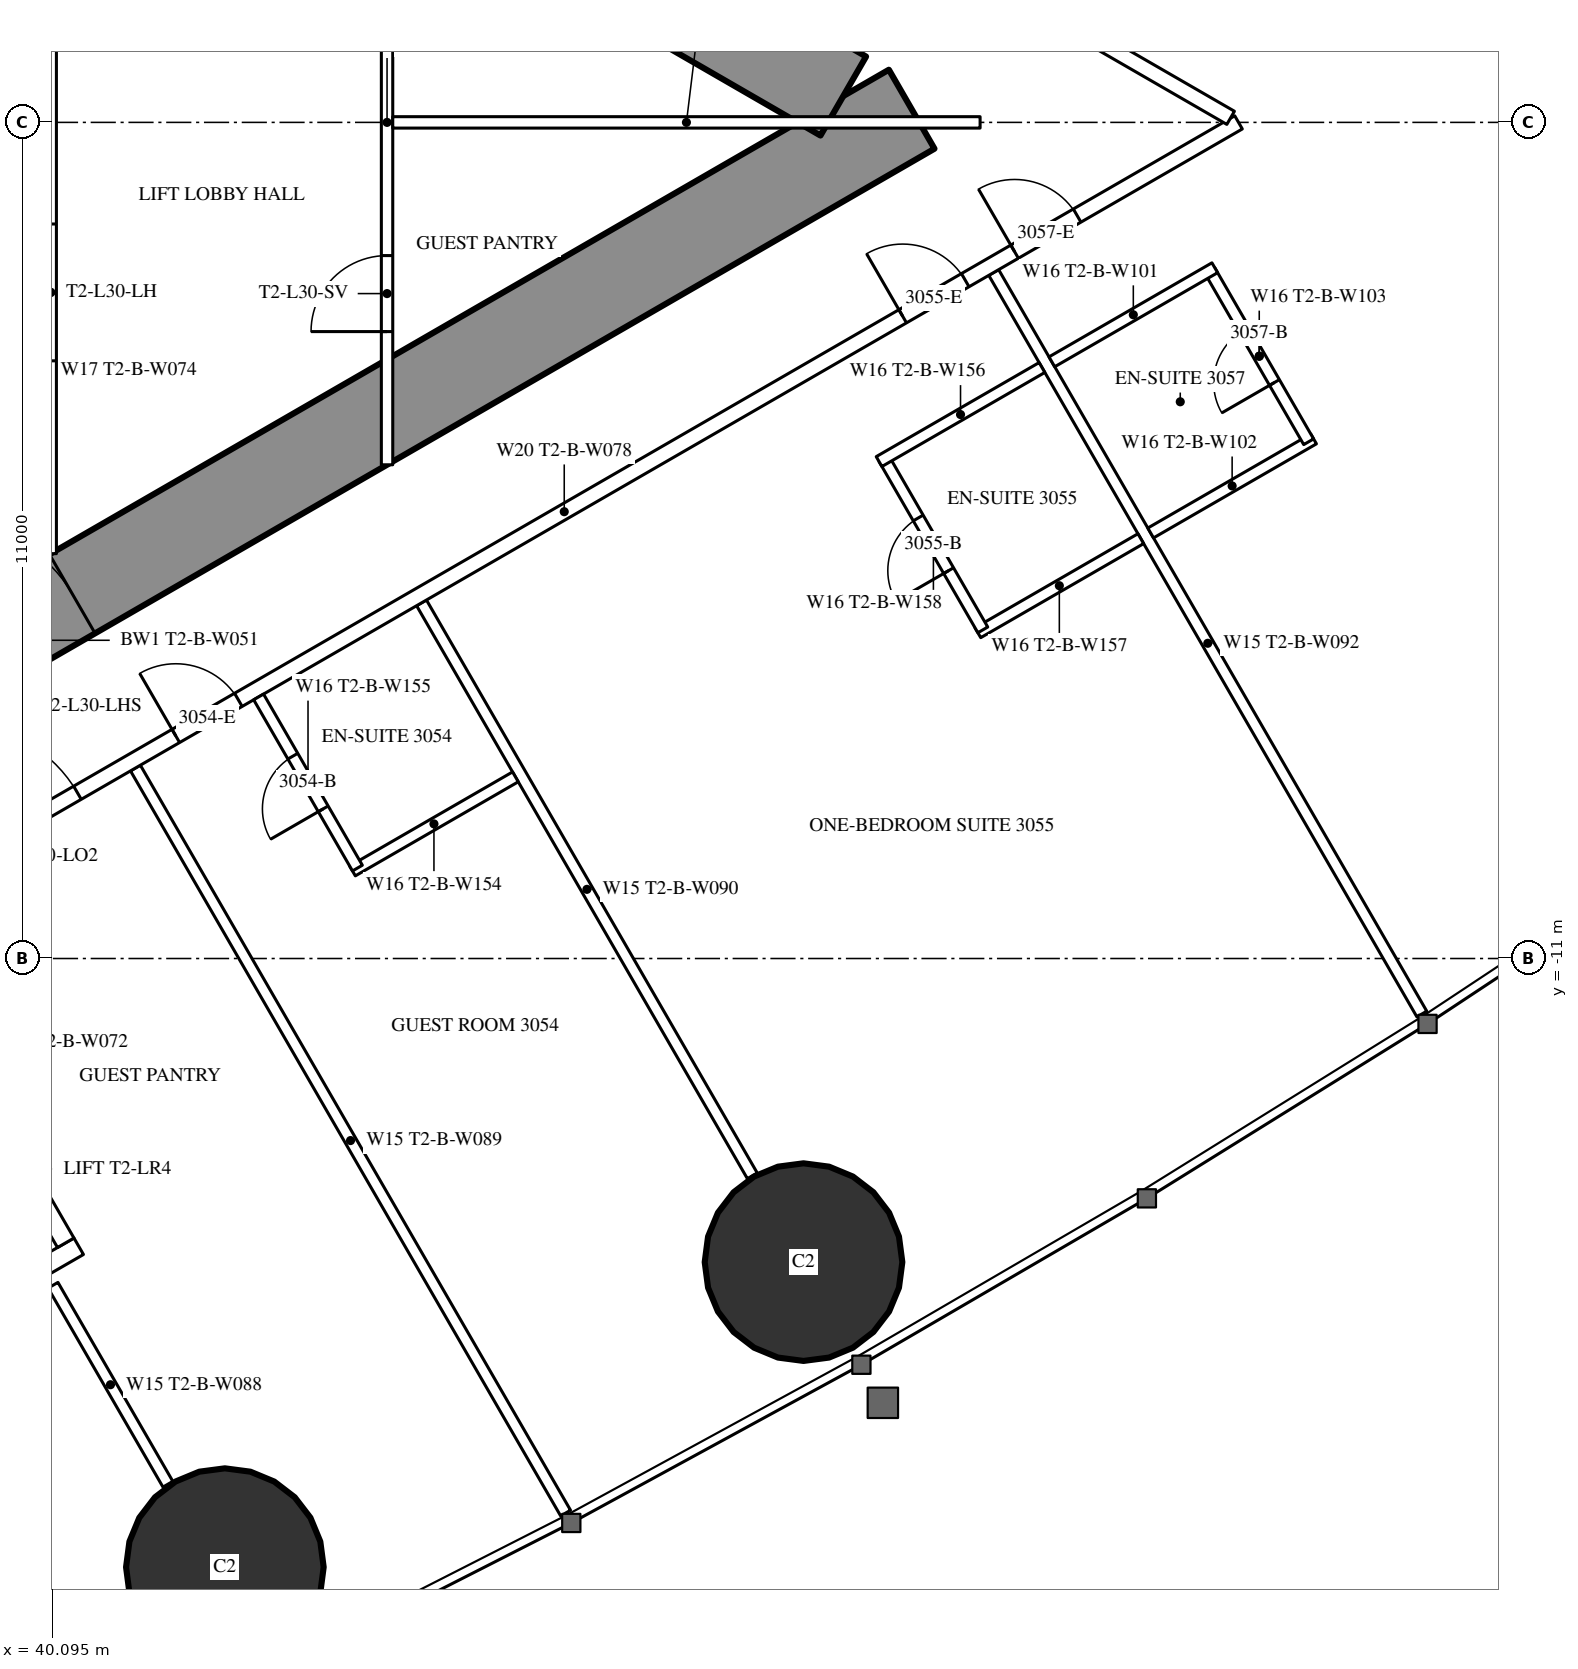
"""IFC4 building model, lengths in metres.
Left out: names, types, materials, properties, quantities, classifications, styles, units other than length and angle.
Written with IfcOpenShell. Run it as: python <this file> out.ifc"""

import sys

from ifc_helpers import new_model, si_unit, direction, frame, frame_2d, origin, origin_2d, place, context, subcontext, project, spatial, rectangle, hollow_circle, extrude, element, fill, save


model = new_model("IFC4")
c1 = context("Model", 3, precision=1e-05, world=origin(), true_north=direction((0.0, 1.0)))
c2 = subcontext(c1, "Body", "Model", "MODEL_VIEW")
j1 = project(units=[si_unit("LENGTHUNIT", "METRE"), si_unit("PLANEANGLEUNIT", "RADIAN")], contexts=[c1])
p1 = place(None, origin())
s1 = spatial("IfcSite", under=j1, at=p1, CompositionType="ELEMENT")
p2 = place(p1, origin())
s2 = spatial("IfcBuilding", under=s1, at=p2, CompositionType="ELEMENT")
p3 = place(p2, frame((0.0, 0.0, 115.1)))
s3 = spatial("IfcBuildingStorey", under=s2, at=p3, CompositionType="ELEMENT", Elevation=115.1)
for number, where, z_axis, x_axis in (
    (1, (42.366, -19.007, 0.0), (0.0, 0.0, 1.0), (1.0, 0.0, 0.0)),
    (2, (49.979, -14.994, 0.0), (0.0, 0.0, 1.0), (1.0, 0.0, 0.0)),
):
    element("IfcColumn", number, at=place(p3, frame(where, z_axis=z_axis, x_axis=x_axis)), inside=s3, PredefinedType="COLUMN", context=c2, shape_type="SweptSolid", body=[
        extrude(hollow_circle(Radius=1.3, WallThickness=0.1, at=origin_2d()), origin(), (0.0, 0.0, 1.0), 3.5),
    ])
p4 = place(p3, frame((27.2, -13.8, 0.0), z_axis=(0.0, 0.0, 1.0), x_axis=(0.866027159892, 0.499996958321, 0.0)))
e3 = element("IfcWall", 3, at=p4, inside=s3, PredefinedType="SHEAR", context=c2, shape_type="SweptSolid", body=[
    extrude(rectangle(XDim=27.947, YDim=1.2, at=frame_2d((13.973, 0.0))), origin(), (0.0, 0.0, 1.0), 3.5),
])
p5 = place(p4, frame((4.6, 0.0, 0.0)))
e4 = element("IfcOpeningElement", 4, at=p5, cuts=e3, PredefinedType="OPENING", context=c2, shape_type="SweptSolid", body=[
    extrude(rectangle(XDim=1.0, YDim=2.2, at=frame_2d((0.5, 1.1))), frame((0.0, 0.61, 0.0), z_axis=(0.0, -1.0, 0.0), x_axis=(1.0, 0.0, 0.0)), (0.0, 0.0, 1.0), 1.22),
])
p6 = place(p4, frame((13.395, 0.0, 0.0)))
e5 = element("IfcOpeningElement", 5, at=p6, cuts=e3, PredefinedType="OPENING", context=c2, shape_type="SweptSolid", body=[
    extrude(rectangle(XDim=1.8, YDim=2.2, at=frame_2d((0.9, 1.1))), frame((0.0, 0.61, 0.0), z_axis=(0.0, -1.0, 0.0), x_axis=(1.0, 0.0, 0.0)), (0.0, 0.0, 1.0), 1.22),
])
p7 = place(p3, frame((27.2, 13.8, 0.0), z_axis=(0.0, 0.0, 1.0), x_axis=(0.866024515034, -0.500001539357, 0.0)))
e6 = element("IfcWall", 6, at=p7, inside=s3, PredefinedType="SHEAR", context=c2, shape_type="SweptSolid", body=[
    extrude(rectangle(XDim=26.907, YDim=1.2, at=frame_2d((13.454, 0.0))), origin(), (0.0, 0.0, 1.0), 3.5),
])
p8 = place(p7, frame((4.6, 0.0, 0.0)))
e7 = element("IfcOpeningElement", 7, at=p8, cuts=e6, PredefinedType="OPENING", context=c2, shape_type="SweptSolid", body=[
    extrude(rectangle(XDim=1.0, YDim=2.2, at=frame_2d((0.5, 1.1))), frame((0.0, 0.61, 0.0), z_axis=(0.0, -1.0, 0.0), x_axis=(1.0, 0.0, 0.0)), (0.0, 0.0, 1.0), 1.22),
])
p9 = place(p7, frame((13.395, 0.0, 0.0)))
e8 = element("IfcOpeningElement", 8, at=p9, cuts=e6, PredefinedType="OPENING", context=c2, shape_type="SweptSolid", body=[
    extrude(rectangle(XDim=1.8, YDim=2.2, at=frame_2d((0.9, 1.1))), frame((0.0, 0.61, 0.0), z_axis=(0.0, -1.0, 0.0), x_axis=(1.0, 0.0, 0.0)), (0.0, 0.0, 1.0), 1.22),
])
p10 = place(p3, frame((41.19, -8.494, 0.0), z_axis=(0.0, 0.0, 1.0), x_axis=(0.49999258054, -0.866029687369, 0.0)))
e9 = element("IfcWall", 9, at=p10, inside=s3, PredefinedType="PARTITIONING", context=c2, shape_type="SweptSolid", body=[
    extrude(rectangle(XDim=11.318, YDim=0.15, at=frame_2d((5.659, 0.0))), origin(), (0.0, 0.0, 1.0), 3.25),
])
p11 = place(p3, frame((44.954, -6.321, 0.0), z_axis=(0.0, 0.0, 1.0), x_axis=(0.500018676722, -0.866014620505, 0.0)))
e10 = element("IfcWall", 10, at=p11, inside=s3, PredefinedType="PARTITIONING", context=c2, shape_type="SweptSolid", body=[
    extrude(rectangle(XDim=8.704, YDim=0.15, at=frame_2d((4.352, 0.0))), origin(), (0.0, 0.0, 1.0), 2.2),
])
p12 = place(p3, frame((52.481, -1.975, 0.0), z_axis=(0.0, 0.0, 1.0), x_axis=(0.500003867771, -0.866023170714, 0.0)))
e11 = element("IfcWall", 11, at=p12, inside=s3, PredefinedType="PARTITIONING", context=c2, shape_type="SweptSolid", body=[
    extrude(rectangle(XDim=11.265, YDim=0.15, at=frame_2d((5.632, 0.0))), origin(), (0.0, 0.0, 1.0), 3.25),
])
p13 = place(p3, frame((40.105, -15.299, 0.0), z_axis=(0.0, 0.0, 1.0), x_axis=(0.499978822259, -0.866037630414, 0.0)))
e12 = element("IfcWall", 12, at=p13, inside=s3, PredefinedType="PARTITIONING", context=c2, shape_type="SweptSolid", body=[
    extrude(rectangle(XDim=3.023, YDim=0.15, at=frame_2d((1.511, 0.0))), origin(), (0.0, 0.0, 1.0), 3.25),
])
p14 = place(p3, frame((37.96, -10.243, 0.0), z_axis=(0.0, 0.0, 1.0), x_axis=(0.866026429433, 0.499998223521, 0.0)))
e13 = element("IfcWall", 13, at=p14, inside=s3, PredefinedType="PARTITIONING", context=c2, shape_type="SweptSolid", body=[
    extrude(rectangle(XDim=20.487, YDim=0.2, at=frame_2d((10.243, 0.0))), origin(), (0.0, 0.0, 1.0), 3.25),
])
p15 = place(p14, frame((4.343, 0.0, 0.0)))
e14 = element("IfcOpeningElement", 14, at=p15, cuts=e13, PredefinedType="OPENING", context=c2, shape_type="SweptSolid", body=[
    extrude(rectangle(XDim=0.95, YDim=2.2, at=frame_2d((0.475, 1.1))), frame((0.0, 0.11, 0.0), z_axis=(0.0, -1.0, 0.0), x_axis=(1.0, 0.0, 0.0)), (0.0, 0.0, 1.0), 0.22),
])
p16 = place(p14, frame((15.385, 0.0, 0.0)))
e15 = element("IfcOpeningElement", 15, at=p16, cuts=e13, PredefinedType="OPENING", context=c2, shape_type="SweptSolid", body=[
    extrude(rectangle(XDim=0.95, YDim=2.2, at=frame_2d((0.475, 1.1))), frame((0.0, 0.11, 0.0), z_axis=(0.0, -1.0, 0.0), x_axis=(1.0, 0.0, 0.0)), (0.0, 0.0, 1.0), 0.22),
])
p17 = place(p14, frame((17.085, 0.0, 0.0)))
e16 = element("IfcOpeningElement", 16, at=p17, cuts=e13, PredefinedType="OPENING", context=c2, shape_type="SweptSolid", body=[
    extrude(rectangle(XDim=0.95, YDim=2.2, at=frame_2d((0.475, 1.1))), frame((0.0, 0.11, 0.0), z_axis=(0.0, -1.0, 0.0), x_axis=(1.0, 0.0, 0.0)), (0.0, 0.0, 1.0), 0.22),
])
p18 = place(p14, frame((1.048, 0.0, 0.0)))
e17 = element("IfcOpeningElement", 17, at=p18, cuts=e13, PredefinedType="OPENING", context=c2, shape_type="SweptSolid", body=[
    extrude(rectangle(XDim=1.8, YDim=2.2, at=frame_2d((0.9, 1.1))), frame((0.0, 0.11, 0.0), z_axis=(0.0, -1.0, 0.0), x_axis=(1.0, 0.0, 0.0)), (0.0, 0.0, 1.0), 0.22),
])
p19 = place(p3, frame((44.925, 6.222, 0.0), z_axis=(0.0, 0.0, 1.0), x_axis=(0.866025590081, -0.499999677325, 0.0)))
e18 = element("IfcWall", 18, at=p19, inside=s3, PredefinedType="PARTITIONING", context=c2, shape_type="SweptSolid", body=[
    extrude(rectangle(XDim=12.324, YDim=0.2, at=frame_2d((6.162, 0.0))), origin(), (0.0, 0.0, 1.0), 3.25),
])
p20 = place(p19, frame((9.042, 0.0, 0.0)))
e19 = element("IfcOpeningElement", 19, at=p20, cuts=e18, PredefinedType="OPENING", context=c2, shape_type="SweptSolid", body=[
    extrude(rectangle(XDim=0.95, YDim=2.2, at=frame_2d((0.475, 1.1))), frame((0.0, 0.11, 0.0), z_axis=(0.0, -1.0, 0.0), x_axis=(1.0, 0.0, 0.0)), (0.0, 0.0, 1.0), 0.22),
])
p21 = place(p19, frame((7.342, 0.0, 0.0)))
e20 = element("IfcOpeningElement", 20, at=p21, cuts=e18, PredefinedType="OPENING", context=c2, shape_type="SweptSolid", body=[
    extrude(rectangle(XDim=0.95, YDim=2.2, at=frame_2d((0.475, 1.1))), frame((0.0, 0.11, 0.0), z_axis=(0.0, -1.0, 0.0), x_axis=(1.0, 0.0, 0.0)), (0.0, 0.0, 1.0), 0.22),
])
p22 = place(p19, frame((0.6, 0.0, 0.0)))
e21 = element("IfcOpeningElement", 21, at=p22, cuts=e18, PredefinedType="OPENING", context=c2, shape_type="SweptSolid", body=[
    extrude(rectangle(XDim=0.95, YDim=2.2, at=frame_2d((0.475, 1.1))), frame((0.0, 0.11, 0.0), z_axis=(0.0, -1.0, 0.0), x_axis=(1.0, 0.0, 0.0)), (0.0, 0.0, 1.0), 0.22),
])
p23 = place(p3, frame((44.045, -9.848, 0.0), z_axis=(0.0, 0.0, 1.0), x_axis=(0.866031185235, 0.4999899861, 0.0)))
e22 = element("IfcWall", 22, at=p23, inside=s3, PredefinedType="PARTITIONING", context=c2, shape_type="SweptSolid", body=[
    extrude(rectangle(XDim=2.475, YDim=0.15, at=frame_2d((1.238, 0.0))), origin(), (0.0, 0.0, 1.0), 3.25),
])
p24 = place(p3, frame((42.81, -7.559, 0.0), z_axis=(0.0, 0.0, 1.0), x_axis=(0.499936506574, -0.866062058628, 0.0)))
e23 = element("IfcWall", 23, at=p24, inside=s3, PredefinedType="PARTITIONING", context=c2, shape_type="SweptSolid", body=[
    extrude(rectangle(XDim=2.6, YDim=0.15, at=frame_2d((1.3, 0.0))), origin(), (0.0, 0.0, 1.0), 3.25),
])
p25 = place(p24, frame((0.9, 0.0, 0.0)))
e24 = element("IfcOpeningElement", 24, at=p25, cuts=e23, PredefinedType="OPENING", context=c2, shape_type="SweptSolid", body=[
    extrude(rectangle(XDim=0.8, YDim=2.2, at=frame_2d((0.4, 1.1))), frame((0.0, 0.085, 0.0), z_axis=(0.0, -1.0, 0.0), x_axis=(1.0, 0.0, 0.0)), (0.0, 0.0, 1.0), 0.17),
])
p26 = place(p3, frame((52.273, -6.714, 0.0), z_axis=(0.0, 0.0, 1.0), x_axis=(0.866031185235, 0.4999899861, 0.0)))
e25 = element("IfcWall", 25, at=p26, inside=s3, PredefinedType="PARTITIONING", context=c2, shape_type="SweptSolid", body=[
    extrude(rectangle(XDim=2.475, YDim=0.15, at=frame_2d((1.238, 0.0))), origin(), (0.0, 0.0, 1.0), 3.25),
])
p27 = place(p3, frame((51.038, -4.425, 0.0), z_axis=(0.0, 0.0, 1.0), x_axis=(0.49997716683, -0.86603858612, 0.0)))
e26 = element("IfcWall", 26, at=p27, inside=s3, PredefinedType="PARTITIONING", context=c2, shape_type="SweptSolid", body=[
    extrude(rectangle(XDim=2.6, YDim=0.15, at=frame_2d((1.3, 0.0))), origin(), (0.0, 0.0, 1.0), 3.25),
])
p28 = place(p27, frame((0.9, 0.0, 0.0)))
e27 = element("IfcOpeningElement", 27, at=p28, cuts=e26, PredefinedType="OPENING", context=c2, shape_type="SweptSolid", body=[
    extrude(rectangle(XDim=0.8, YDim=2.2, at=frame_2d((0.4, 1.1))), frame((0.0, 0.085, 0.0), z_axis=(0.0, -1.0, 0.0), x_axis=(1.0, 0.0, 0.0)), (0.0, 0.0, 1.0), 0.17),
])
p29 = place(p3, frame((50.973, -4.462, 0.0), z_axis=(0.0, 0.0, 1.0), x_axis=(0.866031185235, 0.4999899861, 0.0)))
e28 = element("IfcWall", 28, at=p29, inside=s3, PredefinedType="PARTITIONING", context=c2, shape_type="SweptSolid", body=[
    extrude(rectangle(XDim=2.475, YDim=0.15, at=frame_2d((1.238, 0.0))), origin(), (0.0, 0.0, 1.0), 3.25),
])
p30 = place(p3, frame((54.546, -5.402, 0.0), z_axis=(0.0, 0.0, 1.0), x_axis=(0.866006523861, 0.500032699561, 0.0)))
e29 = element("IfcWall", 29, at=p30, inside=s3, PredefinedType="PARTITIONING", context=c2, shape_type="SweptSolid", body=[
    extrude(rectangle(XDim=2.475, YDim=0.15, at=frame_2d((1.237, 0.0))), origin(), (0.0, 0.0, 1.0), 3.25),
])
p31 = place(p3, frame((55.325, -1.95, 0.0), z_axis=(0.0, 0.0, 1.0), x_axis=(0.500006934395, -0.866021400173, 0.0)))
e30 = element("IfcWall", 30, at=p31, inside=s3, PredefinedType="PARTITIONING", context=c2, shape_type="SweptSolid", body=[
    extrude(rectangle(XDim=2.6, YDim=0.15, at=frame_2d((1.3, 0.0))), origin(), (0.0, 0.0, 1.0), 3.25),
])
p32 = place(p31, frame((0.9, 0.0, 0.0)))
e31 = element("IfcOpeningElement", 31, at=p32, cuts=e30, PredefinedType="OPENING", context=c2, shape_type="SweptSolid", body=[
    extrude(rectangle(XDim=0.8, YDim=2.2, at=frame_2d((0.4, 1.1))), frame((0.0, 0.085, 0.0), z_axis=(0.0, -1.0, 0.0), x_axis=(1.0, 0.0, 0.0)), (0.0, 0.0, 1.0), 0.17),
])
p33 = place(p3, frame((53.246, -3.15, 0.0), z_axis=(0.0, 0.0, 1.0), x_axis=(0.866006523861, 0.500032699561, 0.0)))
e32 = element("IfcWall", 32, at=p33, inside=s3, PredefinedType="PARTITIONING", context=c2, shape_type="SweptSolid", body=[
    extrude(rectangle(XDim=2.475, YDim=0.15, at=frame_2d((1.237, 0.0))), origin(), (0.0, 0.0, 1.0), 3.25),
])
p34 = place(p3, frame((40.075, -5.674, 0.0), z_axis=(0.0, 0.0, 1.0), x_axis=(0.0, 1.0, 0.0)))
e33 = element("IfcWall", 33, at=p34, inside=s3, PredefinedType="PARTITIONING", context=c2, shape_type="SweptSolid", body=[
    extrude(rectangle(XDim=6.874, YDim=0.15, at=frame_2d((3.437, 0.0))), origin(), (0.0, 0.0, 1.0), 3.25),
])
p35 = place(p34, frame((2.537, 0.0, 0.0)))
e34 = element("IfcOpeningElement", 34, at=p35, cuts=e33, PredefinedType="OPENING", context=c2, shape_type="SweptSolid", body=[
    extrude(rectangle(XDim=1.8, YDim=2.2, at=frame_2d((0.9, 1.1))), frame((0.0, 0.085, 0.0), z_axis=(0.0, -1.0, 0.0), x_axis=(1.0, 0.0, 0.0)), (0.0, 0.0, 1.0), 0.17),
])
p36 = place(p3, frame((44.5, -4.505, 0.0), z_axis=(0.0, 0.0, 1.0), x_axis=(0.0, 1.0, 0.0)))
e35 = element("IfcWall", 35, at=p36, inside=s3, PredefinedType="PARTITIONING", context=c2, shape_type="SweptSolid", body=[
    extrude(rectangle(XDim=9.009, YDim=0.15, at=frame_2d((4.505, 0.0))), origin(), (0.0, 0.0, 1.0), 2.45),
])
p37 = place(p36, frame((1.752, 0.0, 0.0)))
e36 = element("IfcOpeningElement", 36, at=p37, cuts=e35, PredefinedType="OPENING", context=c2, shape_type="SweptSolid", body=[
    extrude(rectangle(XDim=1.0, YDim=2.2, at=frame_2d((0.5, 1.1))), frame((0.0, 0.085, 0.0), z_axis=(0.0, -1.0, 0.0), x_axis=(1.0, 0.0, 0.0)), (0.0, 0.0, 1.0), 0.17),
])
p38 = place(p36, frame((6.257, 0.0, 0.0)))
e37 = element("IfcOpeningElement", 37, at=p38, cuts=e35, PredefinedType="OPENING", context=c2, shape_type="SweptSolid", body=[
    extrude(rectangle(XDim=1.0, YDim=2.2, at=frame_2d((0.5, 1.1))), frame((0.0, 0.085, 0.0), z_axis=(0.0, -1.0, 0.0), x_axis=(1.0, 0.0, 0.0)), (0.0, 0.0, 1.0), 0.17),
])
p39 = place(p3, frame((44.575, 0.0, 0.0), z_axis=(0.0, 0.0, 1.0), x_axis=(1.0, 0.0, 0.0)))
e38 = element("IfcWall", 38, at=p39, inside=s3, PredefinedType="PARTITIONING", context=c2, shape_type="SweptSolid", body=[
    extrude(rectangle(XDim=7.727, YDim=0.15, at=frame_2d((3.864, 0.0))), origin(), (0.0, 0.0, 1.0), 2.2),
])
p40 = place(p3, frame((32.996, -19.086, 0.0), z_axis=(0.0, 0.0, 1.0), x_axis=(0.866028165386, 0.499995216735, 0.0)))
e39 = element("IfcWall", 39, at=p40, inside=s3, PredefinedType="PARTITIONING", context=c2, shape_type="SweptSolid", body=[
    extrude(rectangle(XDim=8.6, YDim=0.25, at=frame_2d((4.3, 0.0))), origin(), (0.0, 0.0, 1.0), 3.25),
])
p41 = place(p3, frame((38.673, -11.968, 0.0), z_axis=(0.0, 0.0, 1.0), x_axis=(0.499929347863, -0.866066190972, 0.0)))
e40 = element("IfcWall", 40, at=p41, inside=s3, PredefinedType="PARTITIONING", context=c2, shape_type="SweptSolid", body=[
    extrude(rectangle(XDim=3.201, YDim=0.25, at=frame_2d((1.6, 0.0))), origin(), (0.0, 0.0, 1.0), 3.25),
])
p42 = place(p25, origin())
e41 = element("IfcDoor", 41, at=p42, inside=s3, OperationType="SINGLE_SWING_RIGHT", PredefinedType="DOOR", context=c2, shape_type="SweptSolid", body=[
    extrude(rectangle(XDim=0.8, YDim=2.2, at=frame_2d((0.4, 1.1))), frame((0.0, 0.025, 0.0), z_axis=(0.0, -1.0, 0.0), x_axis=(1.0, 0.0, 0.0)), (0.0, 0.0, 1.0), 0.05),
])
fill(e24, e41)
p43 = place(p15, origin())
e42 = element("IfcDoor", 42, at=p43, inside=s3, OperationType="SINGLE_SWING_LEFT", PredefinedType="DOOR", context=c2, shape_type="SweptSolid", body=[
    extrude(rectangle(XDim=0.95, YDim=2.2, at=frame_2d((0.475, 1.1))), frame((0.0, 0.025, 0.0), z_axis=(0.0, -1.0, 0.0), x_axis=(1.0, 0.0, 0.0)), (0.0, 0.0, 1.0), 0.05),
])
fill(e14, e42)
p44 = place(p28, origin())
e43 = element("IfcDoor", 43, at=p44, inside=s3, OperationType="SINGLE_SWING_RIGHT", PredefinedType="DOOR", context=c2, shape_type="SweptSolid", body=[
    extrude(rectangle(XDim=0.8, YDim=2.2, at=frame_2d((0.4, 1.1))), frame((0.0, 0.025, 0.0), z_axis=(0.0, -1.0, 0.0), x_axis=(1.0, 0.0, 0.0)), (0.0, 0.0, 1.0), 0.05),
])
fill(e27, e43)
p45 = place(p16, origin())
e44 = element("IfcDoor", 44, at=p45, inside=s3, OperationType="SINGLE_SWING_LEFT", PredefinedType="DOOR", context=c2, shape_type="SweptSolid", body=[
    extrude(rectangle(XDim=0.95, YDim=2.2, at=frame_2d((0.475, 1.1))), frame((0.0, 0.025, 0.0), z_axis=(0.0, -1.0, 0.0), x_axis=(1.0, 0.0, 0.0)), (0.0, 0.0, 1.0), 0.05),
])
fill(e15, e44)
p46 = place(p32, origin())
e45 = element("IfcDoor", 45, at=p46, inside=s3, OperationType="SINGLE_SWING_RIGHT", PredefinedType="DOOR", context=c2, shape_type="SweptSolid", body=[
    extrude(rectangle(XDim=0.8, YDim=2.2, at=frame_2d((0.4, 1.1))), frame((0.0, 0.025, 0.0), z_axis=(0.0, -1.0, 0.0), x_axis=(1.0, 0.0, 0.0)), (0.0, 0.0, 1.0), 0.05),
])
fill(e31, e45)
p47 = place(p17, origin())
e46 = element("IfcDoor", 46, at=p47, inside=s3, OperationType="SINGLE_SWING_LEFT", PredefinedType="DOOR", context=c2, shape_type="SweptSolid", body=[
    extrude(rectangle(XDim=0.95, YDim=2.2, at=frame_2d((0.475, 1.1))), frame((0.0, 0.025, 0.0), z_axis=(0.0, -1.0, 0.0), x_axis=(1.0, 0.0, 0.0)), (0.0, 0.0, 1.0), 0.05),
])
fill(e16, e46)
p48 = place(p18, origin())
e47 = element("IfcDoor", 47, at=p48, inside=s3, OperationType="DOUBLE_DOOR_SINGLE_SWING", PredefinedType="DOOR", context=c2, shape_type="SweptSolid", body=[
    extrude(rectangle(XDim=1.8, YDim=2.2, at=frame_2d((0.9, 1.1))), frame((0.0, 0.025, 0.0), z_axis=(0.0, -1.0, 0.0), x_axis=(1.0, 0.0, 0.0)), (0.0, 0.0, 1.0), 0.05),
])
fill(e17, e47)
p49 = place(p35, origin())
e48 = element("IfcDoor", 48, at=p49, inside=s3, OperationType="DOUBLE_DOOR_SINGLE_SWING", PredefinedType="DOOR", context=c2, shape_type="SweptSolid", body=[
    extrude(rectangle(XDim=1.8, YDim=2.2, at=frame_2d((0.9, 1.1))), frame((0.0, 0.025, 0.0), z_axis=(0.0, -1.0, 0.0), x_axis=(1.0, 0.0, 0.0)), (0.0, 0.0, 1.0), 0.05),
])
fill(e34, e48)
p50 = place(p37, origin())
e49 = element("IfcDoor", 49, at=p50, inside=s3, OperationType="SINGLE_SWING_LEFT", PredefinedType="DOOR", context=c2, shape_type="SweptSolid", body=[
    extrude(rectangle(XDim=1.0, YDim=2.2, at=frame_2d((0.5, 1.1))), frame((0.0, 0.025, 0.0), z_axis=(0.0, -1.0, 0.0), x_axis=(1.0, 0.0, 0.0)), (0.0, 0.0, 1.0), 0.05),
])
fill(e36, e49)
p51 = place(p6, origin())
e50 = element("IfcDoor", 50, at=p51, inside=s3, OperationType="DOUBLE_DOOR_SINGLE_SWING", PredefinedType="DOOR", context=c2, shape_type="SweptSolid", body=[
    extrude(rectangle(XDim=1.8, YDim=2.2, at=frame_2d((0.9, 1.1))), frame((0.0, 0.025, 0.0), z_axis=(0.0, -1.0, 0.0), x_axis=(1.0, 0.0, 0.0)), (0.0, 0.0, 1.0), 0.05),
])
fill(e5, e50)
save(model, sys.argv[1])
